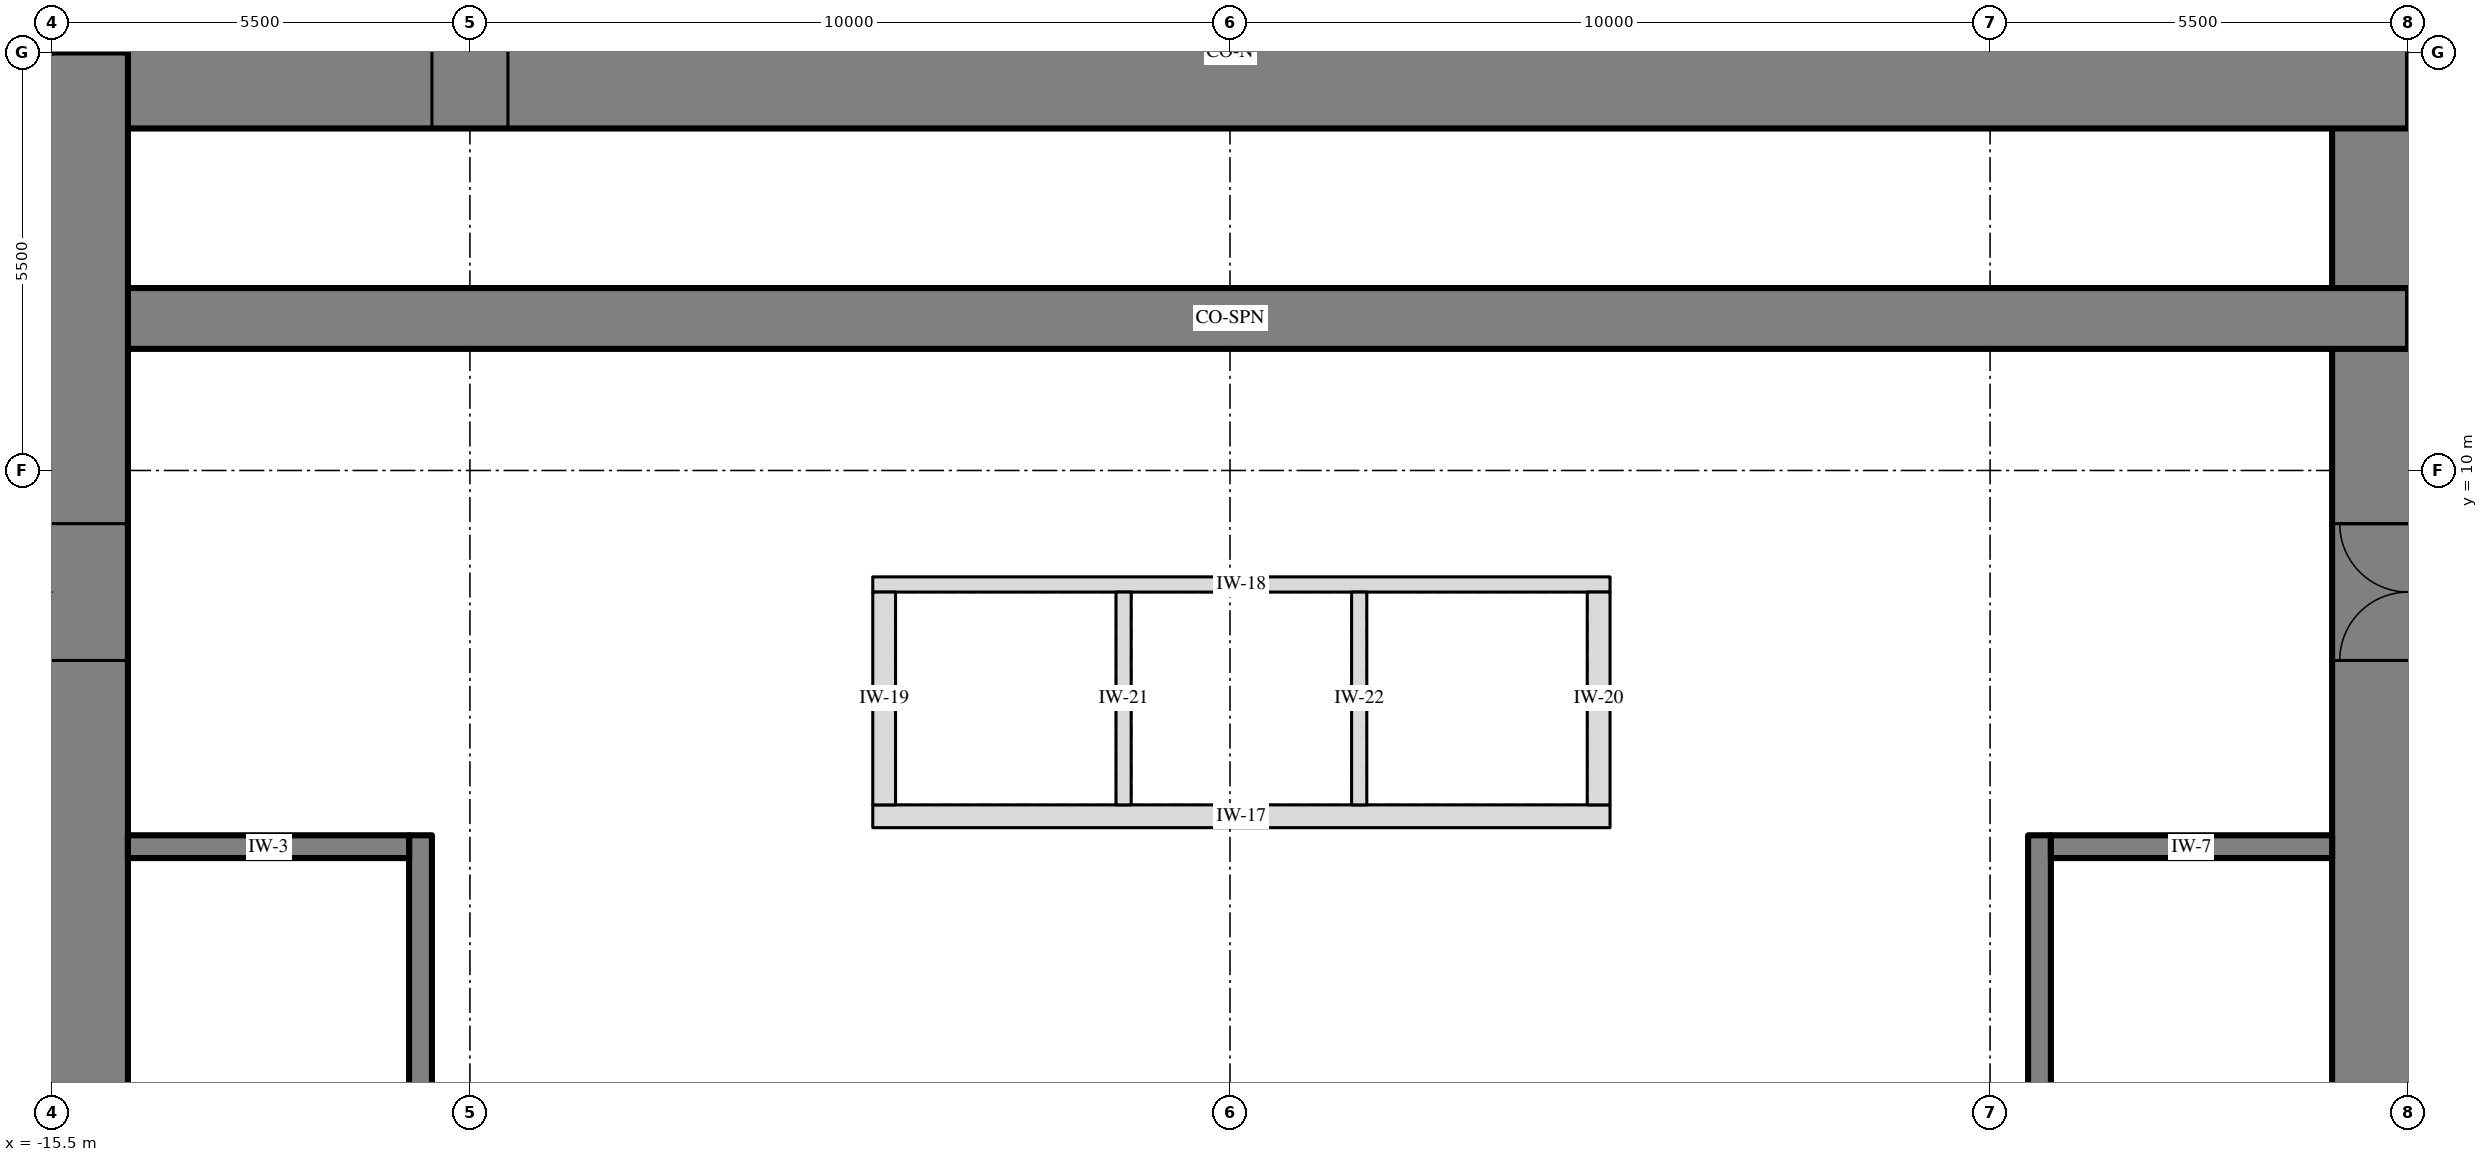
"""IFC4 building model, lengths in metres.
Left out: names, types, materials, properties, quantities, classifications, styles, units other than length and angle.
Written with IfcOpenShell. Run it as: python <this file> out.ifc"""

import sys

from ifc_helpers import new_model, si_unit, direction, frame, frame_2d, origin, place, context, subcontext, project, spatial, rectangle, extrude, element, fill, save


model = new_model("IFC4")
c1 = context("Model", 3, precision=1e-05, world=origin(), true_north=direction((0.0, 1.0)))
c2 = subcontext(c1, "Body", "Model", "MODEL_VIEW")
j1 = project(units=[si_unit("LENGTHUNIT", "METRE"), si_unit("PLANEANGLEUNIT", "RADIAN")], contexts=[c1])
p1 = place(None, origin())
s1 = spatial("IfcSite", under=j1, at=p1, CompositionType="ELEMENT")
p2 = place(p1, origin())
s2 = spatial("IfcBuilding", under=s1, at=p2, CompositionType="ELEMENT")
p3 = place(p2, frame((0.0, 0.0, 107.25)))
s3 = spatial("IfcBuildingStorey", under=s2, at=p3, CompositionType="ELEMENT", Elevation=107.25)
p4 = place(p3, frame((15.5, -15.5, -0.25), z_axis=(0.0, 0.0, 1.0), x_axis=(0.0, 1.0, 0.0)))
e1 = element("IfcWall", 1, at=p4, inside=s3, PredefinedType="SHEAR", context=c2, shape_type="SweptSolid", body=[
    extrude(rectangle(XDim=31.0, YDim=2.0, at=frame_2d((15.5, 0.0))), origin(), (0.0, 0.0, 1.0), 3.75),
])
p5 = place(p4, frame((6.5, 0.0, 0.25)))
e2 = element("IfcOpeningElement", 2, at=p5, cuts=e1, PredefinedType="OPENING", context=c2, shape_type="SweptSolid", body=[
    extrude(rectangle(XDim=1.2, YDim=2.1, at=frame_2d((0.6, 1.05))), frame((0.0, 1.01, 0.0), z_axis=(0.0, -1.0, 0.0), x_axis=(1.0, 0.0, 0.0)), (0.0, 0.0, 1.0), 2.02),
])
p6 = place(p4, frame((23.0, 0.0, 0.25)))
e3 = element("IfcOpeningElement", 3, at=p6, cuts=e1, PredefinedType="OPENING", context=c2, shape_type="SweptSolid", body=[
    extrude(rectangle(XDim=1.8, YDim=2.1, at=frame_2d((0.9, 1.05))), frame((0.0, 1.01, 0.0), z_axis=(0.0, -1.0, 0.0), x_axis=(1.0, 0.0, 0.0)), (0.0, 0.0, 1.0), 2.02),
])
p7 = place(p3, frame((-15.5, 15.5, -0.25), z_axis=(0.0, 0.0, 1.0), x_axis=(1.0, 0.0, 0.0)))
e4 = element("IfcWall", 4, at=p7, inside=s3, PredefinedType="SHEAR", context=c2, shape_type="SweptSolid", body=[
    extrude(rectangle(XDim=31.0, YDim=2.0, at=frame_2d((15.5, 0.0))), origin(), (0.0, 0.0, 1.0), 3.75),
])
p8 = place(p7, frame((5.0, 0.0, 0.25)))
e5 = element("IfcOpeningElement", 5, at=p8, cuts=e4, PredefinedType="OPENING", context=c2, shape_type="SweptSolid", body=[
    extrude(rectangle(XDim=1.0, YDim=2.1, at=frame_2d((0.5, 1.05))), frame((0.0, 1.01, 0.0), z_axis=(0.0, -1.0, 0.0), x_axis=(1.0, 0.0, 0.0)), (0.0, 0.0, 1.0), 2.02),
])
p9 = place(p3, frame((-15.5, 12.0, -0.25), z_axis=(0.0, 0.0, 1.0), x_axis=(1.0, 0.0, 0.0)))
e6 = element("IfcWall", 6, at=p9, inside=s3, PredefinedType="SHEAR", context=c2, shape_type="SweptSolid", body=[
    extrude(rectangle(XDim=31.0, YDim=0.8, at=frame_2d((15.5, 0.0))), origin(), (0.0, 0.0, 1.0), 3.75),
])
p10 = place(p3, frame((-15.5, -15.5, -0.25), z_axis=(0.0, 0.0, 1.0), x_axis=(0.0, 1.0, 0.0)))
e7 = element("IfcWall", 7, at=p10, inside=s3, PredefinedType="SHEAR", context=c2, shape_type="SweptSolid", body=[
    extrude(rectangle(XDim=31.0, YDim=2.0, at=frame_2d((15.5, 0.0))), origin(), (0.0, 0.0, 1.0), 3.75),
])
p11 = place(p10, frame((6.5, 0.0, 0.25)))
e8 = element("IfcOpeningElement", 8, at=p11, cuts=e7, PredefinedType="OPENING", context=c2, shape_type="SweptSolid", body=[
    extrude(rectangle(XDim=1.2, YDim=2.1, at=frame_2d((0.6, 1.05))), frame((0.0, 1.01, 0.0), z_axis=(0.0, -1.0, 0.0), x_axis=(1.0, 0.0, 0.0)), (0.0, 0.0, 1.0), 2.02),
])
p12 = place(p10, frame((23.0, 0.0, 0.25)))
e9 = element("IfcOpeningElement", 9, at=p12, cuts=e7, PredefinedType="OPENING", context=c2, shape_type="SweptSolid", body=[
    extrude(rectangle(XDim=1.8, YDim=2.1, at=frame_2d((0.9, 1.05))), frame((0.0, 1.01, 0.0), z_axis=(0.0, -1.0, 0.0), x_axis=(1.0, 0.0, 0.0)), (0.0, 0.0, 1.0), 2.02),
])
p13 = place(p3, frame((-10.65, -4.9, 0.0), z_axis=(0.0, 0.0, 1.0), x_axis=(0.0, 1.0, 0.0)))
e10 = element("IfcWall", 10, at=p13, inside=s3, PredefinedType="SOLIDWALL", context=c2, shape_type="SweptSolid", body=[
    extrude(rectangle(XDim=10.1, YDim=0.3, at=frame_2d((5.05, 0.0))), origin(), (0.0, 0.0, 1.0), 3.5),
])
p14 = place(p3, frame((-14.5, 5.05, 0.0), z_axis=(0.0, 0.0, 1.0), x_axis=(1.0, 0.0, 0.0)))
e11 = element("IfcWall", 11, at=p14, inside=s3, PredefinedType="SOLIDWALL", context=c2, shape_type="SweptSolid", body=[
    extrude(rectangle(XDim=3.7, YDim=0.3, at=frame_2d((1.85, 0.0))), origin(), (0.0, 0.0, 1.0), 3.5),
])
p15 = place(p3, frame((10.65, -4.9, 0.0), z_axis=(0.0, 0.0, 1.0), x_axis=(0.0, 1.0, 0.0)))
e12 = element("IfcWall", 12, at=p15, inside=s3, PredefinedType="SOLIDWALL", context=c2, shape_type="SweptSolid", body=[
    extrude(rectangle(XDim=10.1, YDim=0.3, at=frame_2d((5.05, 0.0))), origin(), (0.0, 0.0, 1.0), 3.5),
])
p16 = place(p3, frame((14.5, 5.05, 0.0), z_axis=(0.0, 0.0, 1.0), x_axis=(-1.0, 0.0, 0.0)))
e13 = element("IfcWall", 13, at=p16, inside=s3, PredefinedType="SOLIDWALL", context=c2, shape_type="SweptSolid", body=[
    extrude(rectangle(XDim=3.7, YDim=0.3, at=frame_2d((1.85, 0.0))), origin(), (0.0, 0.0, 1.0), 3.5),
])
p17 = place(p3, frame((-4.7, 5.45, 0.0), z_axis=(0.0, 0.0, 1.0), x_axis=(1.0, 0.0, 0.0)))
e14 = element("IfcWall", 14, at=p17, inside=s3, PredefinedType="PARTITIONING", context=c2, shape_type="SweptSolid", body=[
    extrude(rectangle(XDim=9.7, YDim=0.3, at=frame_2d((4.85, 0.0))), origin(), (0.0, 0.0, 1.0), 3.5),
])
p18 = place(p3, frame((-4.7, 8.5, 0.0), z_axis=(0.0, 0.0, 1.0), x_axis=(1.0, 0.0, 0.0)))
e15 = element("IfcWall", 15, at=p18, inside=s3, PredefinedType="PARTITIONING", context=c2, shape_type="SweptSolid", body=[
    extrude(rectangle(XDim=9.7, YDim=0.2, at=frame_2d((4.85, 0.0))), origin(), (0.0, 0.0, 1.0), 3.5),
])
for number, where, z_axis, x_axis in (
    (16, (-4.55, 5.6, 0.0), (0.0, 0.0, 1.0), (0.0, 1.0, 0.0)),
    (17, (4.85, 5.6, 0.0), (0.0, 0.0, 1.0), (0.0, 1.0, 0.0)),
):
    element("IfcWall", number, at=place(p3, frame(where, z_axis=z_axis, x_axis=x_axis)), inside=s3, PredefinedType="PARTITIONING", context=c2, shape_type="SweptSolid", body=[
        extrude(rectangle(XDim=2.8, YDim=0.3, at=frame_2d((1.4, 0.0))), origin(), (0.0, 0.0, 1.0), 3.5),
    ])
for number, where, z_axis, x_axis in (
    (18, (-1.4, 5.6, 0.0), (0.0, 0.0, 1.0), (0.0, 1.0, 0.0)),
    (19, (1.7, 5.6, 0.0), (0.0, 0.0, 1.0), (0.0, 1.0, 0.0)),
):
    element("IfcWall", number, at=place(p3, frame(where, z_axis=z_axis, x_axis=x_axis)), inside=s3, PredefinedType="PARTITIONING", context=c2, shape_type="SweptSolid", body=[
        extrude(rectangle(XDim=2.8, YDim=0.2, at=frame_2d((1.4, 0.0))), origin(), (0.0, 0.0, 1.0), 3.5),
    ])
p19 = place(p3, frame((-10.65, 2.8, 0.0), z_axis=(0.0, 0.0, 1.0), x_axis=(1.0, 0.0, 0.0)))
e20 = element("IfcWall", 20, at=p19, inside=s3, PredefinedType="PARTITIONING", context=c2, shape_type="SweptSolid", body=[
    extrude(rectangle(XDim=21.3, YDim=0.3, at=frame_2d((10.65, 0.0))), origin(), (0.0, 0.0, 1.0), 3.5),
])
p20 = place(p19, frame((10.05, 0.0, 0.0)))
e21 = element("IfcOpeningElement", 21, at=p20, cuts=e20, PredefinedType="OPENING", context=c2, shape_type="SweptSolid", body=[
    extrude(rectangle(XDim=1.2, YDim=2.1, at=frame_2d((0.6, 1.05))), frame((0.0, 0.16, 0.0), z_axis=(0.0, -1.0, 0.0), x_axis=(1.0, 0.0, 0.0)), (0.0, 0.0, 1.0), 0.32),
])
p21 = place(p19, frame((1.493, 0.0, 0.0)))
e22 = element("IfcOpeningElement", 22, at=p21, cuts=e20, PredefinedType="OPENING", context=c2, shape_type="SweptSolid", body=[
    extrude(rectangle(XDim=0.9, YDim=2.1, at=frame_2d((0.45, 1.05))), frame((0.0, 0.16, 0.0), z_axis=(0.0, -1.0, 0.0), x_axis=(1.0, 0.0, 0.0)), (0.0, 0.0, 1.0), 0.32),
])
p22 = place(p19, frame((18.836, 0.0, 0.0)))
e23 = element("IfcOpeningElement", 23, at=p22, cuts=e20, PredefinedType="OPENING", context=c2, shape_type="SweptSolid", body=[
    extrude(rectangle(XDim=0.9, YDim=2.1, at=frame_2d((0.45, 1.05))), frame((0.0, 0.16, 0.0), z_axis=(0.0, -1.0, 0.0), x_axis=(1.0, 0.0, 0.0)), (0.0, 0.0, 1.0), 0.32),
])
p23 = place(p3, frame((-3.3, -6.65, 0.0), z_axis=(0.0, 0.0, 1.0), x_axis=(0.0, 1.0, 0.0)))
e24 = element("IfcWall", 24, at=p23, inside=s3, PredefinedType="PARTITIONING", context=c2, shape_type="SweptSolid", body=[
    extrude(rectangle(XDim=9.45, YDim=0.3, at=frame_2d((4.725, 0.0))), origin(), (0.0, 0.0, 1.0), 3.5),
])
p24 = place(p23, frame((4.275, 0.0, 0.0)))
e25 = element("IfcOpeningElement", 25, at=p24, cuts=e24, PredefinedType="OPENING", context=c2, shape_type="SweptSolid", body=[
    extrude(rectangle(XDim=0.9, YDim=2.1, at=frame_2d((0.45, 1.05))), frame((0.0, 0.16, 0.0), z_axis=(0.0, -1.0, 0.0), x_axis=(1.0, 0.0, 0.0)), (0.0, 0.0, 1.0), 0.32),
])
p25 = place(p3, frame((3.3, -6.65, 0.0), z_axis=(0.0, 0.0, 1.0), x_axis=(0.0, 1.0, 0.0)))
e26 = element("IfcWall", 26, at=p25, inside=s3, PredefinedType="PARTITIONING", context=c2, shape_type="SweptSolid", body=[
    extrude(rectangle(XDim=9.45, YDim=0.3, at=frame_2d((4.725, 0.0))), origin(), (0.0, 0.0, 1.0), 3.5),
])
p26 = place(p25, frame((4.275, 0.0, 0.0)))
e27 = element("IfcOpeningElement", 27, at=p26, cuts=e26, PredefinedType="OPENING", context=c2, shape_type="SweptSolid", body=[
    extrude(rectangle(XDim=0.9, YDim=2.1, at=frame_2d((0.45, 1.05))), frame((0.0, 0.16, 0.0), z_axis=(0.0, -1.0, 0.0), x_axis=(1.0, 0.0, 0.0)), (0.0, 0.0, 1.0), 0.32),
])
for number, where, z_axis, x_axis in (
    (28, (-6.764, -6.65, 0.0), (0.0, 0.0, 1.0), (0.0, 1.0, 0.0)),
    (29, (6.622, -6.65, 0.0), (0.0, 0.0, 1.0), (0.0, 1.0, 0.0)),
):
    element("IfcWall", number, at=place(p3, frame(where, z_axis=z_axis, x_axis=x_axis)), inside=s3, PredefinedType="PARTITIONING", context=c2, shape_type="SweptSolid", body=[
        extrude(rectangle(XDim=9.45, YDim=0.3, at=frame_2d((4.725, 0.0))), origin(), (0.0, 0.0, 1.0), 3.5),
    ])
p27 = place(p12, origin())
e30 = element("IfcDoor", 30, at=p27, inside=s3, OperationType="DOUBLE_DOOR_SINGLE_SWING", PredefinedType="DOOR", context=c2, shape_type="SweptSolid", body=[
    extrude(rectangle(XDim=1.8, YDim=2.1, at=frame_2d((0.9, 1.05))), frame((0.0, 0.025, 0.0), z_axis=(0.0, -1.0, 0.0), x_axis=(1.0, 0.0, 0.0)), (0.0, 0.0, 1.0), 0.05),
])
fill(e9, e30)
p28 = place(p6, origin())
e31 = element("IfcDoor", 31, at=p28, inside=s3, OperationType="DOUBLE_DOOR_SINGLE_SWING", PredefinedType="DOOR", context=c2, shape_type="SweptSolid", body=[
    extrude(rectangle(XDim=1.8, YDim=2.1, at=frame_2d((0.9, 1.05))), frame((0.0, 0.025, 0.0), z_axis=(0.0, -1.0, 0.0), x_axis=(1.0, 0.0, 0.0)), (0.0, 0.0, 1.0), 0.05),
])
fill(e3, e31)
p29 = place(p20, origin())
e32 = element("IfcDoor", 32, at=p29, inside=s3, OperationType="SINGLE_SWING_LEFT", PredefinedType="DOOR", context=c2, shape_type="SweptSolid", body=[
    extrude(rectangle(XDim=1.2, YDim=2.1, at=frame_2d((0.6, 1.05))), frame((0.0, 0.025, 0.0), z_axis=(0.0, -1.0, 0.0), x_axis=(1.0, 0.0, 0.0)), (0.0, 0.0, 1.0), 0.05),
])
fill(e21, e32)
p30 = place(p21, origin())
e33 = element("IfcDoor", 33, at=p30, inside=s3, OperationType="SINGLE_SWING_LEFT", PredefinedType="DOOR", context=c2, shape_type="SweptSolid", body=[
    extrude(rectangle(XDim=0.9, YDim=2.1, at=frame_2d((0.45, 1.05))), frame((0.0, 0.025, 0.0), z_axis=(0.0, -1.0, 0.0), x_axis=(1.0, 0.0, 0.0)), (0.0, 0.0, 1.0), 0.05),
])
fill(e22, e33)
p31 = place(p22, origin())
e34 = element("IfcDoor", 34, at=p31, inside=s3, OperationType="SINGLE_SWING_RIGHT", PredefinedType="DOOR", context=c2, shape_type="SweptSolid", body=[
    extrude(rectangle(XDim=0.9, YDim=2.1, at=frame_2d((0.45, 1.05))), frame((0.0, 0.025, 0.0), z_axis=(0.0, -1.0, 0.0), x_axis=(1.0, 0.0, 0.0)), (0.0, 0.0, 1.0), 0.05),
])
fill(e23, e34)
p32 = place(p8, origin())
e35 = element("IfcDoor", 35, at=p32, inside=s3, OperationType="SINGLE_SWING_RIGHT", PredefinedType="DOOR", context=c2, shape_type="SweptSolid", body=[
    extrude(rectangle(XDim=1.0, YDim=2.1, at=frame_2d((0.5, 1.05))), frame((0.0, 0.025, 0.0), z_axis=(0.0, -1.0, 0.0), x_axis=(1.0, 0.0, 0.0)), (0.0, 0.0, 1.0), 0.05),
])
fill(e5, e35)
save(model, sys.argv[1])
